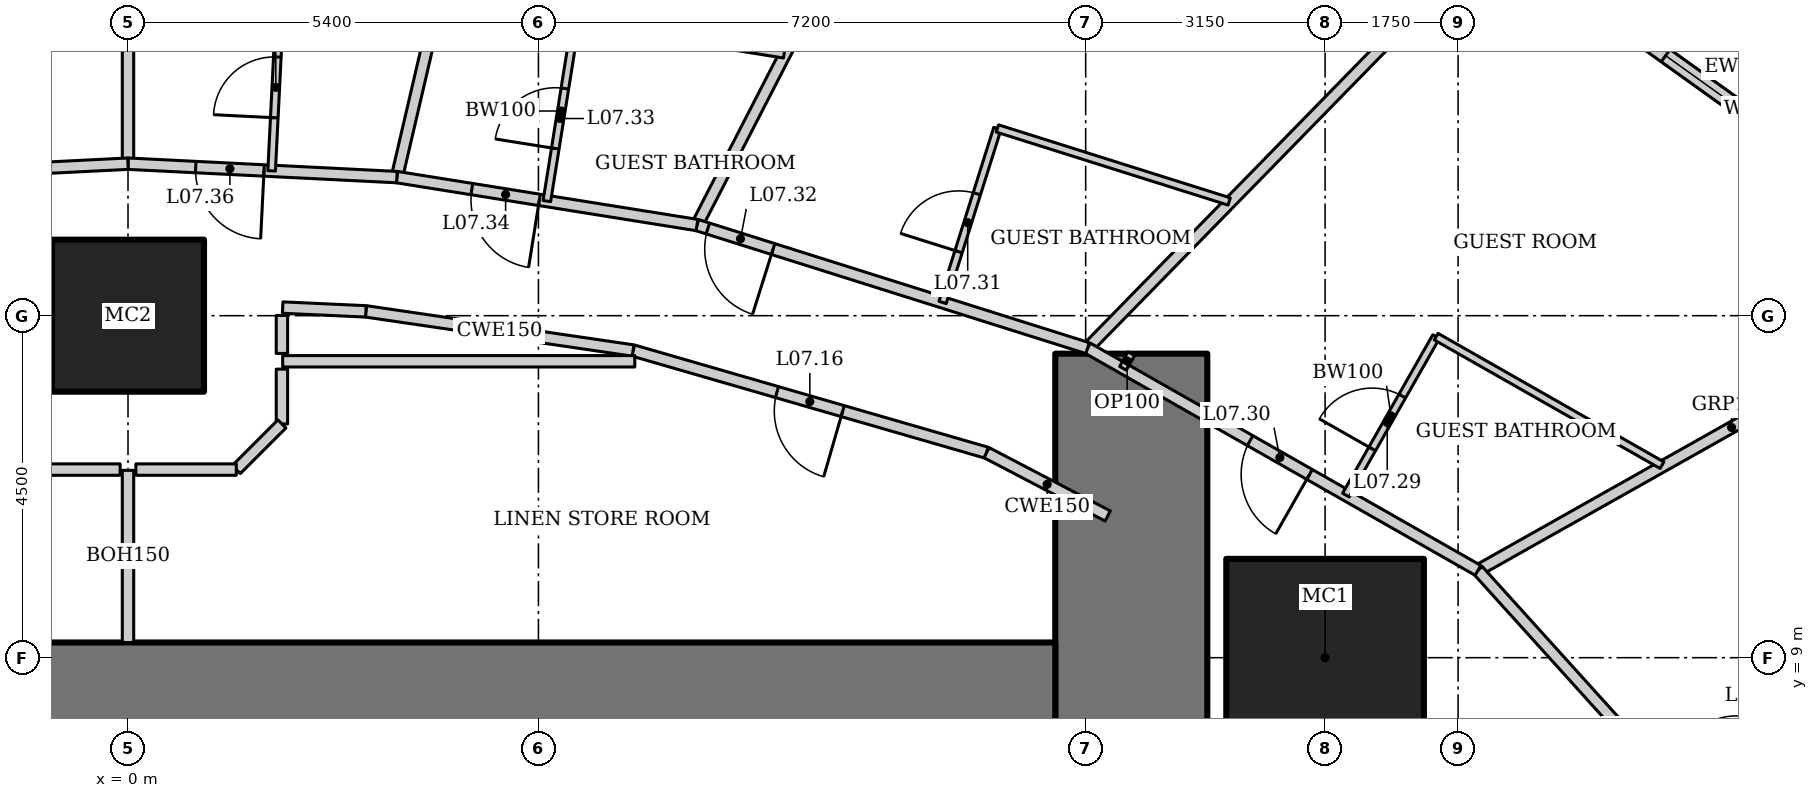
"""IFC4 building model, lengths in metres.
Left out: names, types, materials, properties, quantities, classifications, styles, units other than length and angle.
Written with IfcOpenShell. Run it as: python <this file> out.ifc"""

import sys

from ifc_helpers import new_model, si_unit, direction, frame, frame_2d, origin, origin_2d, place, context, subcontext, project, spatial, rectangle, hollow_rectangle, extrude, element, fill, save


model = new_model("IFC4")
c1 = context("Model", 3, precision=1e-05, world=origin(), true_north=direction((0.0, 1.0)))
c2 = subcontext(c1, "Body", "Model", "MODEL_VIEW")
j1 = project(units=[si_unit("LENGTHUNIT", "METRE"), si_unit("PLANEANGLEUNIT", "RADIAN")], contexts=[c1])
p1 = place(None, origin())
s1 = spatial("IfcSite", under=j1, at=p1, CompositionType="ELEMENT")
p2 = place(p1, origin())
s2 = spatial("IfcBuilding", under=s1, at=p2, CompositionType="ELEMENT")
p3 = place(p2, frame((0.0, 0.0, 40.6)))
s3 = spatial("IfcBuildingStorey", under=s2, at=p3, CompositionType="ELEMENT", Elevation=40.6)
p4 = place(p3, frame((15.75, 9.0, 0.0), z_axis=(0.0, 0.0, 1.0), x_axis=(1.0, 0.0, 0.0)))
e1 = element("IfcColumn", 1, at=p4, inside=s3, PredefinedType="COLUMN", context=c2, shape_type="SweptSolid", body=[
    extrude(hollow_rectangle(XDim=2.6, YDim=2.6, WallThickness=0.13, at=origin_2d()), origin(), (0.0, 0.0, 1.0), 3.6),
])
p5 = place(p3, frame((0.0, 13.5, 0.0), z_axis=(0.0, 0.0, 1.0), x_axis=(1.0, 0.0, 0.0)))
e2 = element("IfcColumn", 2, at=p5, inside=s3, PredefinedType="COLUMN", context=c2, shape_type="SweptSolid", body=[
    extrude(hollow_rectangle(XDim=2.0, YDim=2.0, WallThickness=0.17, at=origin_2d()), origin(), (0.0, 0.0, 1.0), 3.6),
])
p6 = place(p3, frame((13.2, -13.0, 0.0), z_axis=(0.0, 0.0, 1.0), x_axis=(0.0, 1.0, 0.0)))
e3 = element("IfcWall", 3, at=p6, inside=s3, PredefinedType="SHEAR", context=c2, shape_type="SweptSolid", body=[
    extrude(rectangle(XDim=26.0, YDim=2.0, at=frame_2d((13.0, 0.0))), origin(), (0.0, 0.0, 1.0), 3.6),
])
p7 = place(p6, frame((12.1, 0.0, 0.0)))
e4 = element("IfcOpeningElement", 4, at=p7, cuts=e3, PredefinedType="OPENING", context=c2, shape_type="SweptSolid", body=[
    extrude(rectangle(XDim=1.8, YDim=2.1, at=frame_2d((0.9, 1.05))), frame((0.0, 1.01, 0.0), z_axis=(0.0, -1.0, 0.0), x_axis=(1.0, 0.0, 0.0)), (0.0, 0.0, 1.0), 2.02),
])
p8 = place(p3, frame((12.2, 8.0, 0.0), z_axis=(0.0, 0.0, 1.0), x_axis=(-1.0, 0.0, 0.0)))
e5 = element("IfcWall", 5, at=p8, inside=s3, PredefinedType="SHEAR", context=c2, shape_type="SweptSolid", body=[
    extrude(rectangle(XDim=24.4, YDim=2.4, at=frame_2d((12.2, 0.0))), origin(), (0.0, 0.0, 1.0), 3.6),
])
p9 = place(p3, frame((24.482, 13.875, 0.0), z_axis=(0.0, 0.0, 1.0), x_axis=(-0.812791321576, 0.582554948112, 0.0)))
e6 = element("IfcWall", 6, at=p9, inside=s3, PredefinedType="SOLIDWALL", context=c2, shape_type="SweptSolid", body=[
    extrude(rectangle(XDim=8.063, YDim=0.2, at=frame_2d((4.032, 0.0))), origin(), (0.0, 0.0, 1.0), 3.45),
])
p10 = place(p9, frame((2.832, 0.0, 0.5)))
e7 = element("IfcOpeningElement", 7, at=p10, cuts=e6, PredefinedType="OPENING", context=c2, shape_type="SweptSolid", body=[
    extrude(rectangle(XDim=2.4, YDim=2.2, at=frame_2d((1.2, 1.1))), frame((0.0, 0.11, 0.0), z_axis=(0.0, -1.0, 0.0), x_axis=(1.0, 0.0, 0.0)), (0.0, 0.0, 1.0), 0.22),
])
p11 = place(p3, frame((24.435, 13.909, 0.0), z_axis=(0.0, 0.0, 1.0), x_axis=(-0.871267209855, -0.490808974074, 0.0)))
e8 = element("IfcWall", 8, at=p11, inside=s3, PredefinedType="PARTITIONING", context=c2, shape_type="SweptSolid", body=[
    extrude(rectangle(XDim=7.659, YDim=0.15, at=frame_2d((3.83, 0.0))), origin(), (0.0, 0.0, 1.0), 2.693),
])
p12 = place(p3, frame((17.97, 18.542, 0.0), z_axis=(0.0, 0.0, 1.0), x_axis=(-0.699032031211, -0.715090357467, 0.0)))
e9 = element("IfcWall", 9, at=p12, inside=s3, PredefinedType="PARTITIONING", context=c2, shape_type="SweptSolid", body=[
    extrude(rectangle(XDim=7.647, YDim=0.15, at=frame_2d((3.824, 0.0))), origin(), (0.0, 0.0, 1.0), 2.528),
])
p13 = place(p3, frame((10.912, 21.346, 0.0), z_axis=(0.0, 0.0, 1.0), x_axis=(-0.45777845119, -0.889066302154, 0.0)))
e10 = element("IfcWall", 10, at=p13, inside=s3, PredefinedType="PARTITIONING", context=c2, shape_type="SweptSolid", body=[
    extrude(rectangle(XDim=7.483, YDim=0.15, at=frame_2d((3.742, 0.0))), origin(), (0.0, 0.0, 1.0), 2.528),
])
p14 = place(p3, frame((5.211, 22.496, 0.0), z_axis=(0.0, 0.0, 1.0), x_axis=(-0.227195035564, -0.973849277771, 0.0)))
e11 = element("IfcWall", 11, at=p14, inside=s3, PredefinedType="PARTITIONING", context=c2, shape_type="SweptSolid", body=[
    extrude(rectangle(XDim=7.365, YDim=0.15, at=frame_2d((3.683, 0.0))), origin(), (0.0, 0.0, 1.0), 2.767),
])
p15 = place(p3, frame((0.0, 22.825, 0.0), z_axis=(0.0, 0.0, 1.0), x_axis=(0.0, -1.0, 0.0)))
e12 = element("IfcWall", 12, at=p15, inside=s3, PredefinedType="PARTITIONING", context=c2, shape_type="SweptSolid", body=[
    extrude(rectangle(XDim=7.325, YDim=0.15, at=frame_2d((3.662, 0.0))), origin(), (0.0, 0.0, 1.0), 2.924),
])
p16 = place(p3, frame((21.982, 5.481, 0.0), z_axis=(0.0, 0.0, 1.0), x_axis=(-0.670598380282, 0.741820606591, 0.0)))
e13 = element("IfcWall", 13, at=p16, inside=s3, PredefinedType="PARTITIONING", context=c2, shape_type="SweptSolid", body=[
    extrude(rectangle(XDim=6.293, YDim=0.15, at=frame_2d((3.147, 0.0))), origin(), (0.0, 0.0, 1.0), 3.45),
])
p17 = place(p16, frame((2.1, 0.0, 0.0)))
e14 = element("IfcOpeningElement", 14, at=p17, cuts=e13, PredefinedType="OPENING", context=c2, shape_type="SweptSolid", body=[
    extrude(rectangle(XDim=0.9, YDim=2.1, at=frame_2d((0.45, 1.05))), frame((0.0, 0.085, 0.0), z_axis=(0.0, -1.0, 0.0), x_axis=(1.0, 0.0, 0.0)), (0.0, 0.0, 1.0), 0.17),
])
p18 = place(p3, frame((17.761, 10.149, 0.0), z_axis=(0.0, 0.0, 1.0), x_axis=(-0.86907565943, 0.494679187136, 0.0)))
e15 = element("IfcWall", 15, at=p18, inside=s3, PredefinedType="PARTITIONING", context=c2, shape_type="SweptSolid", body=[
    extrude(rectangle(XDim=5.911, YDim=0.15, at=frame_2d((2.955, 0.0))), origin(), (0.0, 0.0, 1.0), 3.45),
])
p19 = place(p18, frame((2.55, 0.0, 0.0)))
e16 = element("IfcOpeningElement", 16, at=p19, cuts=e15, PredefinedType="OPENING", context=c2, shape_type="SweptSolid", body=[
    extrude(rectangle(XDim=0.9, YDim=2.1, at=frame_2d((0.45, 1.05))), frame((0.0, 0.085, 0.0), z_axis=(0.0, -1.0, 0.0), x_axis=(1.0, 0.0, 0.0)), (0.0, 0.0, 1.0), 0.17),
])
p20 = place(p3, frame((12.625, 13.073, 0.0), z_axis=(0.0, 0.0, 1.0), x_axis=(-0.953774229808, 0.30052407317, 0.0)))
e17 = element("IfcWall", 17, at=p20, inside=s3, PredefinedType="PARTITIONING", context=c2, shape_type="SweptSolid", body=[
    extrude(rectangle(XDim=5.388, YDim=0.15, at=frame_2d((2.694, 0.0))), origin(), (0.0, 0.0, 1.0), 3.45),
])
p21 = place(p20, frame((4.338, 0.0, 0.0)))
e18 = element("IfcOpeningElement", 18, at=p21, cuts=e17, PredefinedType="OPENING", context=c2, shape_type="SweptSolid", body=[
    extrude(rectangle(XDim=0.9, YDim=2.1, at=frame_2d((0.45, 1.05))), frame((0.0, 0.085, 0.0), z_axis=(0.0, -1.0, 0.0), x_axis=(1.0, 0.0, 0.0)), (0.0, 0.0, 1.0), 0.17),
])
p22 = place(p3, frame((7.486, 14.692, 0.0), z_axis=(0.0, 0.0, 1.0), x_axis=(-0.987475660646, 0.157771415761, 0.0)))
e19 = element("IfcWall", 19, at=p22, inside=s3, PredefinedType="PARTITIONING", context=c2, shape_type="SweptSolid", body=[
    extrude(rectangle(XDim=3.999, YDim=0.15, at=frame_2d((1.999, 0.0))), origin(), (0.0, 0.0, 1.0), 3.45),
])
p23 = place(p22, frame((2.1, 0.0, 0.0)))
e20 = element("IfcOpeningElement", 20, at=p23, cuts=e19, PredefinedType="OPENING", context=c2, shape_type="SweptSolid", body=[
    extrude(rectangle(XDim=0.9, YDim=2.1, at=frame_2d((0.45, 1.05))), frame((0.0, 0.085, 0.0), z_axis=(0.0, -1.0, 0.0), x_axis=(1.0, 0.0, 0.0)), (0.0, 0.0, 1.0), 0.17),
])
p24 = place(p3, frame((3.538, 15.323, 0.0), z_axis=(0.0, 0.0, 1.0), x_axis=(-0.998754057167, 0.049903239295, 0.0)))
e21 = element("IfcWall", 21, at=p24, inside=s3, PredefinedType="PARTITIONING", context=c2, shape_type="SweptSolid", body=[
    extrude(rectangle(XDim=3.542, YDim=0.15, at=frame_2d((1.771, 0.0))), origin(), (0.0, 0.0, 1.0), 3.45),
])
p25 = place(p24, frame((1.75, 0.0, 0.0)))
e22 = element("IfcOpeningElement", 22, at=p25, cuts=e21, PredefinedType="OPENING", context=c2, shape_type="SweptSolid", body=[
    extrude(rectangle(XDim=0.9, YDim=2.1, at=frame_2d((0.45, 1.05))), frame((0.0, 0.085, 0.0), z_axis=(0.0, -1.0, 0.0), x_axis=(1.0, 0.0, 0.0)), (0.0, 0.0, 1.0), 0.17),
])
p26 = place(p3, frame((0.0, 15.5, 0.0), z_axis=(0.0, 0.0, 1.0), x_axis=(-0.998754057167, -0.049903239295, 0.0)))
e23 = element("IfcWall", 23, at=p26, inside=s3, PredefinedType="PARTITIONING", context=c2, shape_type="SweptSolid", body=[
    extrude(rectangle(XDim=3.542, YDim=0.15, at=frame_2d((1.771, 0.0))), origin(), (0.0, 0.0, 1.0), 3.45),
])
p27 = place(p26, frame((2.392, 0.0, 0.0)))
e24 = element("IfcOpeningElement", 24, at=p27, cuts=e23, PredefinedType="OPENING", context=c2, shape_type="SweptSolid", body=[
    extrude(rectangle(XDim=1.0, YDim=2.1, at=frame_2d((0.5, 1.05))), frame((0.0, 0.085, 0.0), z_axis=(0.0, -1.0, 0.0), x_axis=(1.0, 0.0, 0.0)), (0.0, 0.0, 1.0), 0.17),
])
p28 = place(p3, frame((11.296, 11.698, 0.0), z_axis=(0.0, 0.0, 1.0), x_axis=(-0.960678318068, 0.277663770041, 0.0)))
e25 = element("IfcWall", 25, at=p28, inside=s3, PredefinedType="PARTITIONING", context=c2, shape_type="SweptSolid", body=[
    extrude(rectangle(XDim=4.841, YDim=0.15, at=frame_2d((2.421, 0.0))), origin(), (0.0, 0.0, 1.0), 3.45),
])
p29 = place(p28, frame((1.971, 0.0, 0.0)))
e26 = element("IfcOpeningElement", 26, at=p29, cuts=e25, PredefinedType="OPENING", context=c2, shape_type="SweptSolid", body=[
    extrude(rectangle(XDim=0.9, YDim=2.1, at=frame_2d((0.45, 1.05))), frame((0.0, 0.085, 0.0), z_axis=(0.0, -1.0, 0.0), x_axis=(1.0, 0.0, 0.0)), (0.0, 0.0, 1.0), 0.17),
])
p30 = place(p3, frame((6.645, 13.042, 0.0), z_axis=(0.0, 0.0, 1.0), x_axis=(-0.989443047021, 0.14492224364, 0.0)))
e27 = element("IfcWall", 27, at=p30, inside=s3, PredefinedType="PARTITIONING", context=c2, shape_type="SweptSolid", body=[
    extrude(rectangle(XDim=3.553, YDim=0.15, at=frame_2d((1.776, 0.0))), origin(), (0.0, 0.0, 1.0), 3.45),
])
p31 = place(p3, frame((20.641, 6.964, 0.0), z_axis=(0.0, 0.0, 1.0), x_axis=(0.741861025859, 0.670553665496, 0.0)))
e28 = element("IfcWall", 28, at=p31, inside=s3, PredefinedType="PARTITIONING", context=c2, shape_type="SweptSolid", body=[
    extrude(rectangle(XDim=2.4, YDim=0.1, at=frame_2d((1.2, 0.0))), origin(), (0.0, 0.0, 1.0), 3.45),
])
p32 = place(p31, frame((0.7, 0.0, 0.0)))
e29 = element("IfcOpeningElement", 29, at=p32, cuts=e28, PredefinedType="OPENING", context=c2, shape_type="SweptSolid", body=[
    extrude(rectangle(XDim=0.8, YDim=2.1, at=frame_2d((0.4, 1.05))), frame((0.0, 0.06, 0.0), z_axis=(0.0, -1.0, 0.0), x_axis=(1.0, 0.0, 0.0)), (0.0, 0.0, 1.0), 0.12),
])
p33 = place(p3, frame((16.023, 11.139, 0.0), z_axis=(0.0, 0.0, 1.0), x_axis=(0.494659381266, 0.869086932663, 0.0)))
e30 = element("IfcWall", 30, at=p33, inside=s3, PredefinedType="PARTITIONING", context=c2, shape_type="SweptSolid", body=[
    extrude(rectangle(XDim=2.4, YDim=0.1, at=frame_2d((1.2, 0.0))), origin(), (0.0, 0.0, 1.0), 3.45),
])
p34 = place(p33, frame((0.7, 0.0, 0.0)))
e31 = element("IfcOpeningElement", 31, at=p34, cuts=e30, PredefinedType="OPENING", context=c2, shape_type="SweptSolid", body=[
    extrude(rectangle(XDim=0.8, YDim=2.1, at=frame_2d((0.4, 1.05))), frame((0.0, 0.06, 0.0), z_axis=(0.0, -1.0, 0.0), x_axis=(1.0, 0.0, 0.0)), (0.0, 0.0, 1.0), 0.12),
])
p35 = place(p3, frame((17.21, 13.225, 0.0), z_axis=(0.0, 0.0, 1.0), x_axis=(0.869041592831, -0.494739032147, 0.0)))
e32 = element("IfcWall", 32, at=p35, inside=s3, PredefinedType="PARTITIONING", context=c2, shape_type="SweptSolid", body=[
    extrude(rectangle(XDim=3.42, YDim=0.1, at=frame_2d((1.71, 0.0))), origin(), (0.0, 0.0, 1.0), 3.45),
])
p36 = place(p3, frame((10.717, 13.674, 0.0), z_axis=(0.0, 0.0, 1.0), x_axis=(0.30049839721, 0.953782319649, 0.0)))
e33 = element("IfcWall", 33, at=p36, inside=s3, PredefinedType="PARTITIONING", context=c2, shape_type="SweptSolid", body=[
    extrude(rectangle(XDim=2.4, YDim=0.1, at=frame_2d((1.2, 0.0))), origin(), (0.0, 0.0, 1.0), 3.45),
])
p37 = place(p36, frame((0.7, 0.0, 0.0)))
e34 = element("IfcOpeningElement", 34, at=p37, cuts=e33, PredefinedType="OPENING", context=c2, shape_type="SweptSolid", body=[
    extrude(rectangle(XDim=0.8, YDim=2.1, at=frame_2d((0.4, 1.05))), frame((0.0, 0.06, 0.0), z_axis=(0.0, -1.0, 0.0), x_axis=(1.0, 0.0, 0.0)), (0.0, 0.0, 1.0), 0.12),
])
p38 = place(p3, frame((11.438, 15.963, 0.0), z_axis=(0.0, 0.0, 1.0), x_axis=(0.953784420519, -0.300491728963, 0.0)))
e35 = element("IfcWall", 35, at=p38, inside=s3, PredefinedType="PARTITIONING", context=c2, shape_type="SweptSolid", body=[
    extrude(rectangle(XDim=3.197, YDim=0.1, at=frame_2d((1.599, 0.0))), origin(), (0.0, 0.0, 1.0), 3.45),
])
p39 = place(p3, frame((5.511, 15.008, 0.0), z_axis=(0.0, 0.0, 1.0), x_axis=(0.157780217218, 0.987474254376, 0.0)))
e36 = element("IfcWall", 36, at=p39, inside=s3, PredefinedType="PARTITIONING", context=c2, shape_type="SweptSolid", body=[
    extrude(rectangle(XDim=2.4, YDim=0.1, at=frame_2d((1.2, 0.0))), origin(), (0.0, 0.0, 1.0), 3.45),
])
p40 = place(p39, frame((0.7, 0.0, 0.0)))
e37 = element("IfcOpeningElement", 37, at=p40, cuts=e36, PredefinedType="OPENING", context=c2, shape_type="SweptSolid", body=[
    extrude(rectangle(XDim=0.8, YDim=2.1, at=frame_2d((0.4, 1.05))), frame((0.0, 0.06, 0.0), z_axis=(0.0, -1.0, 0.0), x_axis=(1.0, 0.0, 0.0)), (0.0, 0.0, 1.0), 0.12),
])
p41 = place(p3, frame((5.89, 17.378, 0.0), z_axis=(0.0, 0.0, 1.0), x_axis=(0.987476824576, -0.15776413067, 0.0)))
e38 = element("IfcWall", 38, at=p41, inside=s3, PredefinedType="PARTITIONING", context=c2, shape_type="SweptSolid", body=[
    extrude(rectangle(XDim=2.776, YDim=0.1, at=frame_2d((1.388, 0.0))), origin(), (0.0, 0.0, 1.0), 3.45),
])
p42 = place(p3, frame((1.89, 15.406, 0.0), z_axis=(0.0, 0.0, 1.0), x_axis=(0.049947764234, 0.998751831462, 0.0)))
e39 = element("IfcWall", 39, at=p42, inside=s3, PredefinedType="PARTITIONING", context=c2, shape_type="SweptSolid", body=[
    extrude(rectangle(XDim=2.4, YDim=0.1, at=frame_2d((1.2, 0.0))), origin(), (0.0, 0.0, 1.0), 2.749),
])
p43 = place(p42, frame((0.7, 0.0, 0.0)))
e40 = element("IfcOpeningElement", 40, at=p43, cuts=e39, PredefinedType="OPENING", context=c2, shape_type="SweptSolid", body=[
    extrude(rectangle(XDim=0.8, YDim=2.1, at=frame_2d((0.4, 1.05))), frame((0.0, 0.06, 0.0), z_axis=(0.0, -1.0, 0.0), x_axis=(1.0, 0.0, 0.0)), (0.0, 0.0, 1.0), 0.12),
])
p44 = place(p3, frame((13.2, 13.0, 0.0), z_axis=(0.0, 0.0, 1.0), x_axis=(-0.49435138335, -0.869262164011, 0.0)))
e41 = element("IfcWall", 41, at=p44, inside=s3, PredefinedType="PARTITIONING", context=c2, shape_type="SweptSolid", body=[
    extrude(rectangle(XDim=0.221, YDim=0.1, at=frame_2d((0.11, 0.0))), origin(), (0.0, 0.0, 1.0), 3.45),
])
p45 = place(p3, frame((3.13, 13.557, 0.0), z_axis=(0.0, 0.0, 1.0), x_axis=(-0.998946843147, 0.045882508292, 0.0)))
e42 = element("IfcWall", 42, at=p45, inside=s3, PredefinedType="PARTITIONING", context=c2, shape_type="SweptSolid", body=[
    extrude(rectangle(XDim=1.096, YDim=0.15, at=frame_2d((0.548, 0.0))), origin(), (0.0, 0.0, 1.0), 3.45),
])
p46 = place(p3, frame((0.0, 9.2, 0.0), z_axis=(0.0, 0.0, 1.0), x_axis=(0.0, 1.0, 0.0)))
e43 = element("IfcWall", 43, at=p46, inside=s3, PredefinedType="PARTITIONING", context=c2, shape_type="SweptSolid", body=[
    extrude(rectangle(XDim=2.265, YDim=0.15, at=frame_2d((1.133, 0.0))), origin(), (0.0, 0.0, 1.0), 3.043),
])
p47 = place(p3, frame((6.668, 12.9, 0.0), z_axis=(0.0, 0.0, 1.0), x_axis=(-1.0, 0.0, 0.0)))
e44 = element("IfcWall", 44, at=p47, inside=s3, PredefinedType="PARTITIONING", context=c2, shape_type="SweptSolid", body=[
    extrude(rectangle(XDim=4.633, YDim=0.15, at=frame_2d((2.316, 0.0))), origin(), (0.0, 0.0, 1.0), 3.45),
])
p48 = place(p3, frame((2.025, 12.797, 0.0), z_axis=(0.0, 0.0, 1.0), x_axis=(0.0, -1.0, 0.0)))
e45 = element("IfcWall", 45, at=p48, inside=s3, PredefinedType="PARTITIONING", context=c2, shape_type="SweptSolid", body=[
    extrude(rectangle(XDim=0.721, YDim=0.15, at=frame_2d((0.361, 0.0))), origin(), (0.0, 0.0, 1.0), 2.749),
])
p49 = place(p3, frame((2.025, 12.075, 0.0), z_axis=(0.0, 0.0, 1.0), x_axis=(-0.707106781187, -0.707106781187, 0.0)))
e46 = element("IfcWall", 46, at=p49, inside=s3, PredefinedType="PARTITIONING", context=c2, shape_type="SweptSolid", body=[
    extrude(rectangle(XDim=0.849, YDim=0.15, at=frame_2d((0.425, 0.0))), origin(), (0.0, 0.0, 1.0), 3.45),
])
p50 = place(p3, frame((1.425, 11.475, 0.0), z_axis=(0.0, 0.0, 1.0), x_axis=(-1.0, 0.0, 0.0)))
e47 = element("IfcWall", 47, at=p50, inside=s3, PredefinedType="PARTITIONING", context=c2, shape_type="SweptSolid", body=[
    extrude(rectangle(XDim=1.321, YDim=0.15, at=frame_2d((0.661, 0.0))), origin(), (0.0, 0.0, 1.0), 3.45),
])
p51 = place(p3, frame((2.025, 13.503, 0.0), z_axis=(0.0, 0.0, 1.0), x_axis=(0.0, -1.0, 0.0)))
e48 = element("IfcWall", 48, at=p51, inside=s3, PredefinedType="PARTITIONING", context=c2, shape_type="SweptSolid", body=[
    extrude(rectangle(XDim=0.5, YDim=0.15, at=frame_2d((0.25, 0.0))), origin(), (0.0, 0.0, 1.0), 3.45),
])
p52 = place(p3, frame((-0.103, 11.475, 0.0), z_axis=(0.0, 0.0, 1.0), x_axis=(-1.0, 0.0, 0.0)))
e49 = element("IfcWall", 49, at=p52, inside=s3, PredefinedType="PARTITIONING", context=c2, shape_type="SweptSolid", body=[
    extrude(rectangle(XDim=1.321, YDim=0.15, at=frame_2d((0.661, 0.0))), origin(), (0.0, 0.0, 1.0), 3.45),
])
p53 = place(p3, frame((12.89, 10.865, 0.0), z_axis=(0.0, 0.0, 1.0), x_axis=(-0.886301440762, 0.463108795104, 0.0)))
e50 = element("IfcWall", 50, at=p53, inside=s3, PredefinedType="PARTITIONING", context=c2, shape_type="SweptSolid", body=[
    extrude(rectangle(XDim=1.798, YDim=0.15, at=frame_2d((0.899, 0.0))), origin(), (0.0, 0.0, 1.0), 3.45),
])
p54 = place(p10, origin())
e51 = element("IfcWindow", 51, at=p54, inside=s3, PartitioningType="SINGLE_PANEL", PredefinedType="WINDOW", context=c2, shape_type="SweptSolid", body=[
    extrude(rectangle(XDim=2.4, YDim=2.2, at=frame_2d((1.2, 1.1))), frame((0.0, 0.03, 0.0), z_axis=(0.0, -1.0, 0.0), x_axis=(1.0, 0.0, 0.0)), (0.0, 0.0, 1.0), 0.06),
])
fill(e7, e51)
p55 = place(p29, origin())
e52 = element("IfcDoor", 52, at=p55, inside=s3, OperationType="SINGLE_SWING_LEFT", PredefinedType="DOOR", context=c2, shape_type="SweptSolid", body=[
    extrude(rectangle(XDim=0.9, YDim=2.1, at=frame_2d((0.45, 1.05))), frame((0.0, 0.025, 0.0), z_axis=(0.0, -1.0, 0.0), x_axis=(1.0, 0.0, 0.0)), (0.0, 0.0, 1.0), 0.05),
])
fill(e26, e52)
p56 = place(p34, origin())
e53 = element("IfcDoor", 53, at=p56, inside=s3, OperationType="SINGLE_SWING_LEFT", PredefinedType="DOOR", context=c2, shape_type="SweptSolid", body=[
    extrude(rectangle(XDim=0.8, YDim=2.1, at=frame_2d((0.4, 1.05))), frame((0.0, 0.025, 0.0), z_axis=(0.0, -1.0, 0.0), x_axis=(1.0, 0.0, 0.0)), (0.0, 0.0, 1.0), 0.05),
])
fill(e31, e53)
p57 = place(p19, origin())
e54 = element("IfcDoor", 54, at=p57, inside=s3, OperationType="SINGLE_SWING_LEFT", PredefinedType="DOOR", context=c2, shape_type="SweptSolid", body=[
    extrude(rectangle(XDim=0.9, YDim=2.1, at=frame_2d((0.45, 1.05))), frame((0.0, 0.025, 0.0), z_axis=(0.0, -1.0, 0.0), x_axis=(1.0, 0.0, 0.0)), (0.0, 0.0, 1.0), 0.05),
])
fill(e16, e54)
p58 = place(p37, origin())
e55 = element("IfcDoor", 55, at=p58, inside=s3, OperationType="SINGLE_SWING_LEFT", PredefinedType="DOOR", context=c2, shape_type="SweptSolid", body=[
    extrude(rectangle(XDim=0.8, YDim=2.1, at=frame_2d((0.4, 1.05))), frame((0.0, 0.025, 0.0), z_axis=(0.0, -1.0, 0.0), x_axis=(1.0, 0.0, 0.0)), (0.0, 0.0, 1.0), 0.05),
])
fill(e34, e55)
p59 = place(p21, origin())
e56 = element("IfcDoor", 56, at=p59, inside=s3, OperationType="SINGLE_SWING_LEFT", PredefinedType="DOOR", context=c2, shape_type="SweptSolid", body=[
    extrude(rectangle(XDim=0.9, YDim=2.1, at=frame_2d((0.45, 1.05))), frame((0.0, 0.025, 0.0), z_axis=(0.0, -1.0, 0.0), x_axis=(1.0, 0.0, 0.0)), (0.0, 0.0, 1.0), 0.05),
])
fill(e18, e56)
p60 = place(p40, origin())
e57 = element("IfcDoor", 57, at=p60, inside=s3, OperationType="SINGLE_SWING_LEFT", PredefinedType="DOOR", context=c2, shape_type="SweptSolid", body=[
    extrude(rectangle(XDim=0.8, YDim=2.1, at=frame_2d((0.4, 1.05))), frame((0.0, 0.025, 0.0), z_axis=(0.0, -1.0, 0.0), x_axis=(1.0, 0.0, 0.0)), (0.0, 0.0, 1.0), 0.05),
])
fill(e37, e57)
p61 = place(p23, origin())
e58 = element("IfcDoor", 58, at=p61, inside=s3, OperationType="SINGLE_SWING_LEFT", PredefinedType="DOOR", context=c2, shape_type="SweptSolid", body=[
    extrude(rectangle(XDim=0.9, YDim=2.1, at=frame_2d((0.45, 1.05))), frame((0.0, 0.025, 0.0), z_axis=(0.0, -1.0, 0.0), x_axis=(1.0, 0.0, 0.0)), (0.0, 0.0, 1.0), 0.05),
])
fill(e20, e58)
p62 = place(p43, origin())
e59 = element("IfcDoor", 59, at=p62, inside=s3, OperationType="SINGLE_SWING_LEFT", PredefinedType="DOOR", context=c2, shape_type="SweptSolid", body=[
    extrude(rectangle(XDim=0.8, YDim=2.1, at=frame_2d((0.4, 1.05))), frame((0.0, 0.025, 0.0), z_axis=(0.0, -1.0, 0.0), x_axis=(1.0, 0.0, 0.0)), (0.0, 0.0, 1.0), 0.05),
])
fill(e40, e59)
p63 = place(p25, origin())
e60 = element("IfcDoor", 60, at=p63, inside=s3, OperationType="SINGLE_SWING_LEFT", PredefinedType="DOOR", context=c2, shape_type="SweptSolid", body=[
    extrude(rectangle(XDim=0.9, YDim=2.1, at=frame_2d((0.45, 1.05))), frame((0.0, 0.025, 0.0), z_axis=(0.0, -1.0, 0.0), x_axis=(1.0, 0.0, 0.0)), (0.0, 0.0, 1.0), 0.05),
])
fill(e22, e60)
save(model, sys.argv[1])
